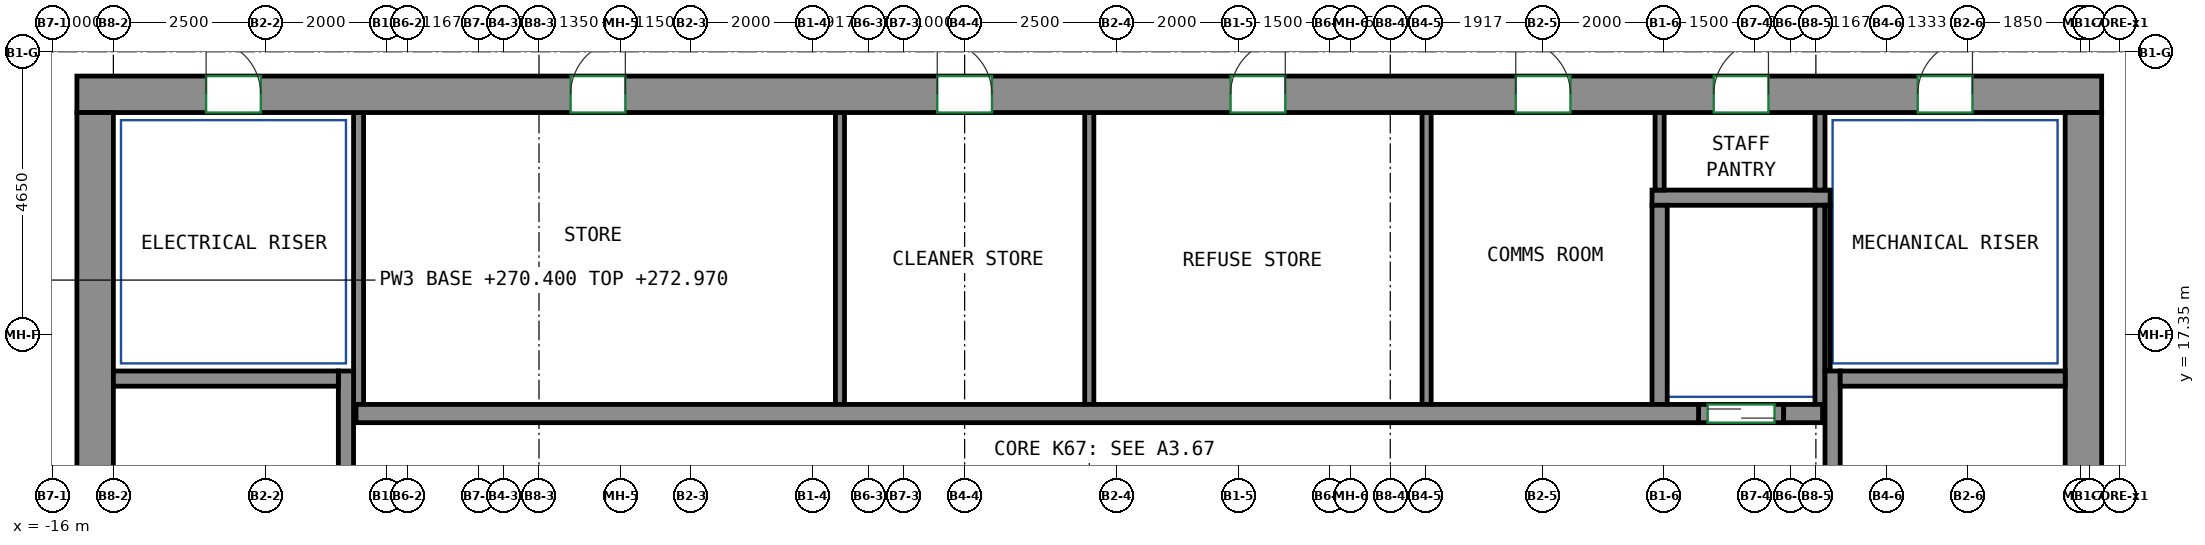
"""IFC4 building model, lengths in metres.
Left out: names, types, materials, properties, quantities, classifications, styles, units other than length and angle.
Written with IfcOpenShell. Run it as: python <this file> out.ifc"""

import sys

from ifc_helpers import new_model, si_unit, direction, frame, frame_2d, origin, place, context, subcontext, project, spatial, rectangle, extrude, source, transform, mapped, element, fill, save


model = new_model("IFC4")
c1 = context("Model", 3, precision=1e-05, world=origin(), true_north=direction((0.0, 1.0)))
c2 = subcontext(c1, "Body", "Model", "MODEL_VIEW")
j1 = project(units=[si_unit("LENGTHUNIT", "METRE"), si_unit("PLANEANGLEUNIT", "RADIAN")], contexts=[c1])
p1 = place(None, origin())
s1 = spatial("IfcSite", under=j1, at=p1, CompositionType="ELEMENT")
p2 = place(p1, origin())
s2 = spatial("IfcBuilding", under=s1, at=p2, CompositionType="ELEMENT")
p3 = place(p2, frame((0.0, 0.0, 270.4)))
s3 = spatial("IfcBuildingStorey", under=s2, at=p3, CompositionType="ELEMENT", Elevation=270.4)
m1 = source(origin(), c2, "Body", "SweptSolid", [
    extrude(rectangle(XDim=33.3, YDim=0.6, at=frame_2d((16.65, 0.0))), origin(), (0.0, 0.0, 1.0), 3.12),
])
p4 = place(p3, frame((-15.6, 21.3, 0.0), z_axis=(0.0, 0.0, 1.0), x_axis=(1.0, 0.0, 0.0)))
e1 = element("IfcWall", 1, at=p4, inside=s3, PredefinedType="SHEAR", context=c2, shape_type="MappedRepresentation", body=[
    mapped(m1, transform((0.0, 0.0, 0.0))),
])
p5 = place(p4, frame((8.12, 0.0, 0.0)))
e2 = element("IfcOpeningElement", 2, at=p5, cuts=e1, PredefinedType="OPENING", context=c2, shape_type="SweptSolid", body=[
    extrude(rectangle(XDim=0.9, YDim=2.1, at=frame_2d((0.45, 1.05))), frame((0.0, 0.31, 0.0), z_axis=(0.0, -1.0, 0.0), x_axis=(1.0, 0.0, 0.0)), (0.0, 0.0, 1.0), 0.62),
])
p6 = place(p4, frame((14.15, 0.0, 0.0)))
e3 = element("IfcOpeningElement", 3, at=p6, cuts=e1, PredefinedType="OPENING", context=c2, shape_type="SweptSolid", body=[
    extrude(rectangle(XDim=0.9, YDim=2.1, at=frame_2d((0.45, 1.05))), frame((0.0, 0.31, 0.0), z_axis=(0.0, -1.0, 0.0), x_axis=(1.0, 0.0, 0.0)), (0.0, 0.0, 1.0), 0.62),
])
p7 = place(p4, frame((18.974, 0.0, 0.0)))
e4 = element("IfcOpeningElement", 4, at=p7, cuts=e1, PredefinedType="OPENING", context=c2, shape_type="SweptSolid", body=[
    extrude(rectangle(XDim=0.9, YDim=2.1, at=frame_2d((0.45, 1.05))), frame((0.0, 0.31, 0.0), z_axis=(0.0, -1.0, 0.0), x_axis=(1.0, 0.0, 0.0)), (0.0, 0.0, 1.0), 0.62),
])
p8 = place(p4, frame((23.664, 0.0, 0.0)))
e5 = element("IfcOpeningElement", 5, at=p8, cuts=e1, PredefinedType="OPENING", context=c2, shape_type="SweptSolid", body=[
    extrude(rectangle(XDim=0.9, YDim=2.1, at=frame_2d((0.45, 1.05))), frame((0.0, 0.31, 0.0), z_axis=(0.0, -1.0, 0.0), x_axis=(1.0, 0.0, 0.0)), (0.0, 0.0, 1.0), 0.62),
])
p9 = place(p4, frame((26.92, 0.0, 0.0)))
e6 = element("IfcOpeningElement", 6, at=p9, cuts=e1, PredefinedType="OPENING", context=c2, shape_type="SweptSolid", body=[
    extrude(rectangle(XDim=0.9, YDim=2.1, at=frame_2d((0.45, 1.05))), frame((0.0, 0.31, 0.0), z_axis=(0.0, -1.0, 0.0), x_axis=(1.0, 0.0, 0.0)), (0.0, 0.0, 1.0), 0.62),
])
p10 = place(p4, frame((2.125, 0.0, 0.0)))
e7 = element("IfcOpeningElement", 7, at=p10, cuts=e1, PredefinedType="OPENING", context=c2, shape_type="SweptSolid", body=[
    extrude(rectangle(XDim=0.9, YDim=2.1, at=frame_2d((0.45, 1.05))), frame((0.0, 0.31, 0.0), z_axis=(0.0, -1.0, 0.0), x_axis=(1.0, 0.0, 0.0)), (0.0, 0.0, 1.0), 0.62),
])
p11 = place(p4, frame((30.275, 0.0, 0.0)))
e8 = element("IfcOpeningElement", 8, at=p11, cuts=e1, PredefinedType="OPENING", context=c2, shape_type="SweptSolid", body=[
    extrude(rectangle(XDim=0.9, YDim=2.1, at=frame_2d((0.45, 1.05))), frame((0.0, 0.31, 0.0), z_axis=(0.0, -1.0, 0.0), x_axis=(1.0, 0.0, 0.0)), (0.0, 0.0, 1.0), 0.62),
])
m2 = source(origin(), c2, "Body", "SweptSolid", [
    extrude(rectangle(XDim=12.0, YDim=0.6, at=frame_2d((6.0, 0.0))), origin(), (0.0, 0.0, 1.0), 3.12),
])
for number, where, z_axis, x_axis in (
    (9, (-15.3, 9.0, 0.0), (0.0, 0.0, 1.0), (0.0, 1.0, 0.0)),
    (10, (17.4, 9.0, 0.0), (0.0, 0.0, 1.0), (0.0, 1.0, 0.0)),
):
    element("IfcWall", number, at=place(p3, frame(where, z_axis=z_axis, x_axis=x_axis)), inside=s3, PredefinedType="SHEAR", context=c2, shape_type="MappedRepresentation", body=[
        mapped(m2, transform((0.0, 0.0, 0.0))),
    ])
m3 = source(origin(), c2, "Body", "SweptSolid", [
    extrude(rectangle(XDim=7.75, YDim=0.25, at=frame_2d((3.875, 0.0))), origin(), (0.0, 0.0, 1.0), 3.12),
])
p12 = place(p3, frame((-11.175, 9.0, 0.0), z_axis=(0.0, 0.0, 1.0), x_axis=(0.0, 1.0, 0.0)))
e11 = element("IfcWall", 11, at=p12, inside=s3, PredefinedType="SHEAR", context=c2, shape_type="MappedRepresentation", body=[
    mapped(m3, transform((0.0, 0.0, 0.0))),
])
m4 = source(origin(), c2, "Body", "SweptSolid", [
    extrude(rectangle(XDim=3.7, YDim=0.25, at=frame_2d((1.85, 0.0))), origin(), (0.0, 0.0, 1.0), 3.12),
])
p13 = place(p3, frame((-15.0, 16.625, 0.0), z_axis=(0.0, 0.0, 1.0), x_axis=(1.0, 0.0, 0.0)))
e12 = element("IfcWall", 12, at=p13, inside=s3, PredefinedType="SHEAR", context=c2, shape_type="MappedRepresentation", body=[
    mapped(m4, transform((0.0, 0.0, 0.0))),
])
p14 = place(p3, frame((13.275, 9.0, 0.0), z_axis=(0.0, 0.0, 1.0), x_axis=(0.0, 1.0, 0.0)))
e13 = element("IfcWall", 13, at=p14, inside=s3, PredefinedType="SHEAR", context=c2, shape_type="MappedRepresentation", body=[
    mapped(m3, transform((0.0, 0.0, 0.0))),
])
m5 = source(origin(), c2, "Body", "SweptSolid", [
    extrude(rectangle(XDim=3.7, YDim=0.25, at=frame_2d((1.85, 0.0))), origin(), (0.0, 0.0, 1.0), 3.12),
])
p15 = place(p3, frame((13.4, 16.625, 0.0), z_axis=(0.0, 0.0, 1.0), x_axis=(1.0, 0.0, 0.0)))
e14 = element("IfcWall", 14, at=p15, inside=s3, PredefinedType="SHEAR", context=c2, shape_type="MappedRepresentation", body=[
    mapped(m5, transform((0.0, 0.0, 0.0))),
])
m6 = source(origin(), c2, "Body", "SweptSolid", [
    extrude(rectangle(XDim=22.08, YDim=0.3, at=frame_2d((11.04, 0.0))), origin(), (0.0, 0.0, 1.0), 3.12),
])
p16 = place(p3, frame((-11.01, 16.05, 0.0), z_axis=(0.0, 0.0, 1.0), x_axis=(1.0, 0.0, 0.0)))
e15 = element("IfcWall", 15, at=p16, inside=s3, PredefinedType="SHEAR", context=c2, shape_type="MappedRepresentation", body=[
    mapped(m6, transform((0.0, 0.0, 0.0))),
])
m7 = source(origin(), c2, "Body", "SweptSolid", [
    extrude(rectangle(XDim=0.64, YDim=0.3, at=frame_2d((0.32, 0.0))), origin(), (0.0, 0.0, 1.0), 3.12),
])
p17 = place(p3, frame((12.47, 16.05, 0.0), z_axis=(0.0, 0.0, 1.0), x_axis=(1.0, 0.0, 0.0)))
e16 = element("IfcWall", 16, at=p17, inside=s3, PredefinedType="SHEAR", context=c2, shape_type="MappedRepresentation", body=[
    mapped(m7, transform((0.0, 0.0, 0.0))),
])
m8 = source(origin(), c2, "Body", "SweptSolid", [
    extrude(rectangle(XDim=1.4, YDim=0.3, at=frame_2d((0.7, 0.0))), origin(), (0.0, 0.0, 1.0), 3.12),
])
p18 = place(p3, frame((11.07, 16.05, 0.0), z_axis=(0.0, 0.0, 1.0), x_axis=(1.0, 0.0, 0.0)))
e17 = element("IfcWall", 17, at=p18, inside=s3, PredefinedType="PARTITIONING", context=c2, shape_type="MappedRepresentation", body=[
    mapped(m8, transform((0.0, 0.0, 0.0))),
])
p19 = place(p18, frame((0.15, 0.0, 0.0)))
e18 = element("IfcOpeningElement", 18, at=p19, cuts=e17, PredefinedType="OPENING", context=c2, shape_type="SweptSolid", body=[
    extrude(rectangle(XDim=1.1, YDim=2.1, at=frame_2d((0.55, 1.05))), frame((0.0, 0.16, 0.0), z_axis=(0.0, -1.0, 0.0), x_axis=(1.0, 0.0, 0.0)), (0.0, 0.0, 1.0), 0.32),
])
m9 = source(origin(), c2, "Body", "SweptSolid", [
    extrude(rectangle(XDim=2.93, YDim=0.25, at=frame_2d((1.465, 0.0))), origin(), (0.0, 0.0, 1.0), 3.12),
])
p20 = place(p3, frame((10.305, 19.6, 0.0), z_axis=(0.0, 0.0, 1.0), x_axis=(1.0, 0.0, 0.0)))
e19 = element("IfcWall", 19, at=p20, inside=s3, PredefinedType="PARTITIONING", context=c2, shape_type="MappedRepresentation", body=[
    mapped(m9, transform((0.0, 0.0, 0.0))),
])
m10 = source(origin(), c2, "Body", "SweptSolid", [
    extrude(rectangle(XDim=3.275, YDim=0.165, at=frame_2d((1.638, 0.0))), origin(), (0.0, 0.0, 1.0), 3.12),
])
p21 = place(p3, frame((13.067, 16.2, 0.0), z_axis=(0.0, 0.0, 1.0), x_axis=(0.0, 1.0, 0.0)))
e20 = element("IfcWall", 20, at=p21, inside=s3, PredefinedType="PARTITIONING", context=c2, shape_type="MappedRepresentation", body=[
    mapped(m10, transform((0.0, 0.0, 0.0))),
])
m11 = source(origin(), c2, "Body", "SweptSolid", [
    extrude(rectangle(XDim=1.275, YDim=0.165, at=frame_2d((0.637, 0.0))), origin(), (0.0, 0.0, 1.0), 3.12),
])
p22 = place(p3, frame((13.067, 19.725, 0.0), z_axis=(0.0, 0.0, 1.0), x_axis=(0.0, 1.0, 0.0)))
e21 = element("IfcWall", 21, at=p22, inside=s3, PredefinedType="PARTITIONING", context=c2, shape_type="MappedRepresentation", body=[
    mapped(m11, transform((0.0, 0.0, 0.0))),
])
m12 = source(origin(), c2, "Body", "SweptSolid", [
    extrude(rectangle(XDim=4.8, YDim=0.165, at=frame_2d((2.4, 0.0))), origin(), (0.0, 0.0, 1.0), 3.12),
])
p23 = place(p3, frame((-10.968, 16.2, 0.0), z_axis=(0.0, 0.0, 1.0), x_axis=(0.0, 1.0, 0.0)))
e22 = element("IfcWall", 22, at=p23, inside=s3, PredefinedType="PARTITIONING", context=c2, shape_type="MappedRepresentation", body=[
    mapped(m12, transform((0.0, 0.0, 0.0))),
])
m13 = source(origin(), c2, "Body", "SweptSolid", [
    extrude(rectangle(XDim=3.275, YDim=0.25, at=frame_2d((1.638, 0.0))), origin(), (0.0, 0.0, 1.0), 3.12),
])
p24 = place(p3, frame((10.43, 16.2, 0.0), z_axis=(0.0, 0.0, 1.0), x_axis=(0.0, 1.0, 0.0)))
e23 = element("IfcWall", 23, at=p24, inside=s3, PredefinedType="PARTITIONING", context=c2, shape_type="MappedRepresentation", body=[
    mapped(m13, transform((0.0, 0.0, 0.0))),
])
m14 = source(origin(), c2, "Body", "SweptSolid", [
    extrude(rectangle(XDim=2.725, YDim=0.085, at=frame_2d((1.363, 0.0))), origin(), (0.0, 0.0, 1.0), 3.12),
])
p25 = place(p3, frame((13.192, 16.75, 0.0), z_axis=(0.0, 0.0, 1.0), x_axis=(0.0, 1.0, 0.0)))
e24 = element("IfcWall", 24, at=p25, inside=s3, PredefinedType="PARTITIONING", context=c2, shape_type="MappedRepresentation", body=[
    mapped(m14, transform((0.0, 0.0, 0.0))),
])
m15 = source(origin(), c2, "Body", "SweptSolid", [
    extrude(rectangle(XDim=4.8, YDim=0.15, at=frame_2d((2.4, 0.0))), origin(), (0.0, 0.0, 1.0), 3.12),
])
for number, where, z_axis, x_axis in (
    (25, (-3.05, 16.2, 0.0), (0.0, 0.0, 1.0), (0.0, 1.0, 0.0)),
    (26, (1.05, 16.2, 0.0), (0.0, 0.0, 1.0), (0.0, 1.0, 0.0)),
    (27, (6.598, 16.2, 0.0), (0.0, 0.0, 1.0), (0.0, 1.0, 0.0)),
):
    element("IfcWall", number, at=place(p3, frame(where, z_axis=z_axis, x_axis=x_axis)), inside=s3, PredefinedType="PARTITIONING", context=c2, shape_type="MappedRepresentation", body=[
        mapped(m15, transform((0.0, 0.0, 0.0))),
    ])
m16 = source(origin(), c2, "Body", "SweptSolid", [
    extrude(rectangle(XDim=1.275, YDim=0.15, at=frame_2d((0.637, 0.0))), origin(), (0.0, 0.0, 1.0), 3.12),
])
p26 = place(p3, frame((10.43, 19.725, 0.0), z_axis=(0.0, 0.0, 1.0), x_axis=(0.0, 1.0, 0.0)))
e28 = element("IfcWall", 28, at=p26, inside=s3, PredefinedType="PARTITIONING", context=c2, shape_type="MappedRepresentation", body=[
    mapped(m16, transform((0.0, 0.0, 0.0))),
])
p27 = place(p19, origin())
e29 = element("IfcDoor", 29, at=p27, inside=s3, OperationType="DOUBLE_DOOR_SLIDING", PredefinedType="DOOR", context=c2, shape_type="SweptSolid", body=[
    extrude(rectangle(XDim=1.1, YDim=2.1, at=frame_2d((0.55, 1.05))), frame((0.0, 0.025, 0.0), z_axis=(0.0, -1.0, 0.0), x_axis=(1.0, 0.0, 0.0)), (0.0, 0.0, 1.0), 0.05),
])
fill(e18, e29)
p28 = place(p5, origin())
e30 = element("IfcDoor", 30, at=p28, inside=s3, OperationType="SINGLE_SWING_RIGHT", PredefinedType="DOOR", context=c2, shape_type="SweptSolid", body=[
    extrude(rectangle(XDim=0.9, YDim=2.1, at=frame_2d((0.45, 1.05))), frame((0.0, -0.155, 0.0), z_axis=(0.0, -1.0, 0.0), x_axis=(1.0, 0.0, 0.0)), (0.0, 0.0, 1.0), 0.05),
])
fill(e2, e30)
p29 = place(p6, origin())
e31 = element("IfcDoor", 31, at=p29, inside=s3, OperationType="SINGLE_SWING_LEFT", PredefinedType="DOOR", context=c2, shape_type="SweptSolid", body=[
    extrude(rectangle(XDim=0.9, YDim=2.1, at=frame_2d((0.45, 1.05))), frame((0.0, -0.155, 0.0), z_axis=(0.0, -1.0, 0.0), x_axis=(1.0, 0.0, 0.0)), (0.0, 0.0, 1.0), 0.05),
])
fill(e3, e31)
p30 = place(p7, origin())
e32 = element("IfcDoor", 32, at=p30, inside=s3, OperationType="SINGLE_SWING_RIGHT", PredefinedType="DOOR", context=c2, shape_type="SweptSolid", body=[
    extrude(rectangle(XDim=0.9, YDim=2.1, at=frame_2d((0.45, 1.05))), frame((0.0, -0.155, 0.0), z_axis=(0.0, -1.0, 0.0), x_axis=(1.0, 0.0, 0.0)), (0.0, 0.0, 1.0), 0.05),
])
fill(e4, e32)
p31 = place(p8, origin())
e33 = element("IfcDoor", 33, at=p31, inside=s3, OperationType="SINGLE_SWING_LEFT", PredefinedType="DOOR", context=c2, shape_type="SweptSolid", body=[
    extrude(rectangle(XDim=0.9, YDim=2.1, at=frame_2d((0.45, 1.05))), frame((0.0, -0.155, 0.0), z_axis=(0.0, -1.0, 0.0), x_axis=(1.0, 0.0, 0.0)), (0.0, 0.0, 1.0), 0.05),
])
fill(e5, e33)
p32 = place(p9, origin())
e34 = element("IfcDoor", 34, at=p32, inside=s3, OperationType="SINGLE_SWING_RIGHT", PredefinedType="DOOR", context=c2, shape_type="SweptSolid", body=[
    extrude(rectangle(XDim=0.9, YDim=2.1, at=frame_2d((0.45, 1.05))), frame((0.0, -0.155, 0.0), z_axis=(0.0, -1.0, 0.0), x_axis=(1.0, 0.0, 0.0)), (0.0, 0.0, 1.0), 0.05),
])
fill(e6, e34)
p33 = place(p10, origin())
e35 = element("IfcDoor", 35, at=p33, inside=s3, OperationType="SINGLE_SWING_LEFT", PredefinedType="DOOR", context=c2, shape_type="SweptSolid", body=[
    extrude(rectangle(XDim=0.9, YDim=2.1, at=frame_2d((0.45, 1.05))), frame((0.0, -0.155, 0.0), z_axis=(0.0, -1.0, 0.0), x_axis=(1.0, 0.0, 0.0)), (0.0, 0.0, 1.0), 0.05),
])
fill(e7, e35)
p34 = place(p11, origin())
e36 = element("IfcDoor", 36, at=p34, inside=s3, OperationType="SINGLE_SWING_RIGHT", PredefinedType="DOOR", context=c2, shape_type="SweptSolid", body=[
    extrude(rectangle(XDim=0.9, YDim=2.1, at=frame_2d((0.45, 1.05))), frame((0.0, -0.155, 0.0), z_axis=(0.0, -1.0, 0.0), x_axis=(1.0, 0.0, 0.0)), (0.0, 0.0, 1.0), 0.05),
])
fill(e8, e36)
save(model, sys.argv[1])
